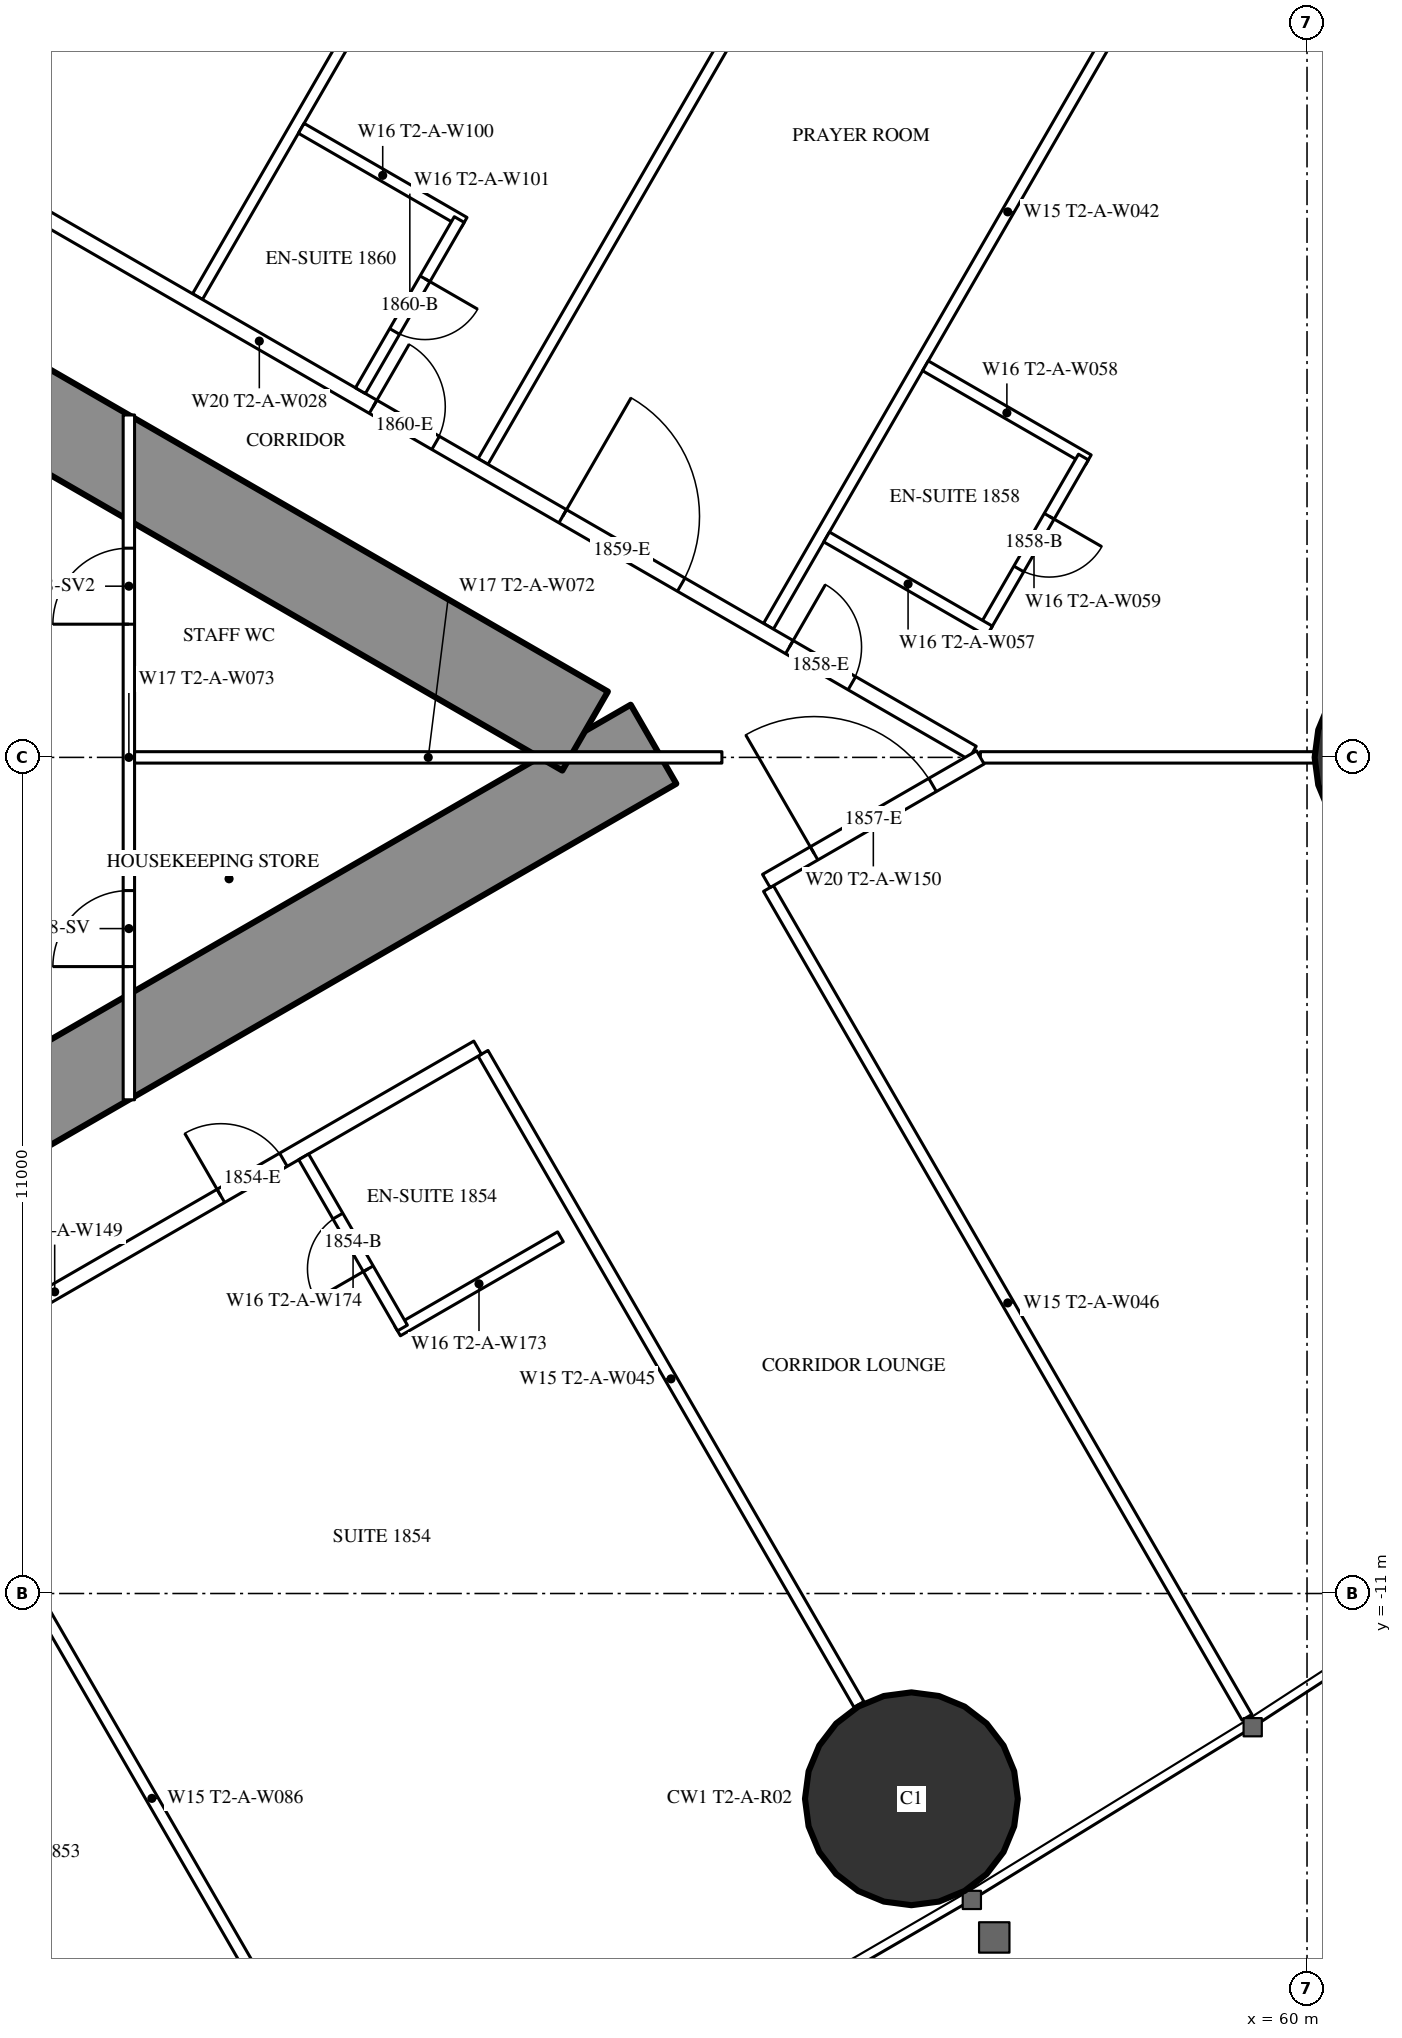
"""IFC4 building model, lengths in metres.
Left out: names, types, materials, properties, quantities, classifications, styles, units other than length and angle.
Written with IfcOpenShell. Run it as: python <this file> out.ifc"""

import sys

from ifc_helpers import new_model, si_unit, direction, frame, frame_2d, origin, origin_2d, place, context, subcontext, project, spatial, rectangle, hollow_circle, extrude, element, fill, save


model = new_model("IFC4")
c1 = context("Model", 3, precision=1e-05, world=origin(), true_north=direction((0.0, 1.0)))
c2 = subcontext(c1, "Body", "Model", "MODEL_VIEW")
j1 = project(units=[si_unit("LENGTHUNIT", "METRE"), si_unit("PLANEANGLEUNIT", "RADIAN")], contexts=[c1])
p1 = place(None, origin())
s1 = spatial("IfcSite", under=j1, at=p1, CompositionType="ELEMENT")
p2 = place(p1, origin())
s2 = spatial("IfcBuilding", under=s1, at=p2, CompositionType="ELEMENT")
p3 = place(p2, frame((0.0, 0.0, 70.5)))
s3 = spatial("IfcBuildingStorey", under=s2, at=p3, CompositionType="ELEMENT", Elevation=70.5)
p4 = place(p3, frame((54.795, -13.701, 0.0), z_axis=(0.0, 0.0, 1.0), x_axis=(1.0, 0.0, 0.0)))
e1 = element("IfcColumn", 1, at=p4, inside=s3, PredefinedType="COLUMN", context=c2, shape_type="SweptSolid", body=[
    extrude(hollow_circle(Radius=1.4, WallThickness=0.12, at=origin_2d()), origin(), (0.0, 0.0, 1.0), 3.5),
])
p5 = place(p3, frame((61.5, 0.0, 0.0), z_axis=(0.0, 0.0, 1.0), x_axis=(1.0, 0.0, 0.0)))
e2 = element("IfcColumn", 2, at=p5, inside=s3, PredefinedType="COLUMN", context=c2, shape_type="SweptSolid", body=[
    extrude(hollow_circle(Radius=1.4, WallThickness=0.1, at=origin_2d()), origin(), (0.0, 0.0, 1.0), 3.5),
])
p6 = place(p3, frame((27.2, -13.8, 0.0), z_axis=(0.0, 0.0, 1.0), x_axis=(0.866027159892, 0.499996958321, 0.0)))
e3 = element("IfcWall", 3, at=p6, inside=s3, PredefinedType="SHEAR", context=c2, shape_type="SweptSolid", body=[
    extrude(rectangle(XDim=27.947, YDim=1.2, at=frame_2d((13.973, 0.0))), origin(), (0.0, 0.0, 1.0), 3.5),
])
p7 = place(p6, frame((4.6, 0.0, 0.0)))
e4 = element("IfcOpeningElement", 4, at=p7, cuts=e3, PredefinedType="OPENING", context=c2, shape_type="SweptSolid", body=[
    extrude(rectangle(XDim=1.0, YDim=2.2, at=frame_2d((0.5, 1.1))), frame((0.0, 0.61, 0.0), z_axis=(0.0, -1.0, 0.0), x_axis=(1.0, 0.0, 0.0)), (0.0, 0.0, 1.0), 1.22),
])
p8 = place(p6, frame((13.395, 0.0, 0.0)))
e5 = element("IfcOpeningElement", 5, at=p8, cuts=e3, PredefinedType="OPENING", context=c2, shape_type="SweptSolid", body=[
    extrude(rectangle(XDim=1.8, YDim=2.2, at=frame_2d((0.9, 1.1))), frame((0.0, 0.61, 0.0), z_axis=(0.0, -1.0, 0.0), x_axis=(1.0, 0.0, 0.0)), (0.0, 0.0, 1.0), 1.22),
])
p9 = place(p3, frame((27.2, 13.8, 0.0), z_axis=(0.0, 0.0, 1.0), x_axis=(0.866024515034, -0.500001539357, 0.0)))
e6 = element("IfcWall", 6, at=p9, inside=s3, PredefinedType="SHEAR", context=c2, shape_type="SweptSolid", body=[
    extrude(rectangle(XDim=26.907, YDim=1.2, at=frame_2d((13.454, 0.0))), origin(), (0.0, 0.0, 1.0), 3.5),
])
p10 = place(p9, frame((4.6, 0.0, 0.0)))
e7 = element("IfcOpeningElement", 7, at=p10, cuts=e6, PredefinedType="OPENING", context=c2, shape_type="SweptSolid", body=[
    extrude(rectangle(XDim=1.0, YDim=2.2, at=frame_2d((0.5, 1.1))), frame((0.0, 0.61, 0.0), z_axis=(0.0, -1.0, 0.0), x_axis=(1.0, 0.0, 0.0)), (0.0, 0.0, 1.0), 1.22),
])
p11 = place(p9, frame((13.395, 0.0, 0.0)))
e8 = element("IfcOpeningElement", 8, at=p11, cuts=e6, PredefinedType="OPENING", context=c2, shape_type="SweptSolid", body=[
    extrude(rectangle(XDim=1.8, YDim=2.2, at=frame_2d((0.9, 1.1))), frame((0.0, 0.61, 0.0), z_axis=(0.0, -1.0, 0.0), x_axis=(1.0, 0.0, 0.0)), (0.0, 0.0, 1.0), 1.22),
])
p12 = place(p3, frame((41.647, -8.23, 0.0), z_axis=(0.0, 0.0, 1.0), x_axis=(0.49998590462, -0.866033541603, 0.0)))
e9 = element("IfcWall", 9, at=p12, inside=s3, PredefinedType="PARTITIONING", context=c2, shape_type="SweptSolid", body=[
    extrude(rectangle(XDim=12.621, YDim=0.15, at=frame_2d((6.311, 0.0))), origin(), (0.0, 0.0, 1.0), 3.25),
])
p13 = place(p3, frame((49.159, -3.893, 0.0), z_axis=(0.0, 0.0, 1.0), x_axis=(0.499998773722, -0.866026111775, 0.0)))
e10 = element("IfcWall", 10, at=p13, inside=s3, PredefinedType="PARTITIONING", context=c2, shape_type="SweptSolid", body=[
    extrude(rectangle(XDim=9.892, YDim=0.15, at=frame_2d((4.946, 0.0))), origin(), (0.0, 0.0, 1.0), 2.25),
])
p14 = place(p3, frame((52.915, -1.725, 0.0), z_axis=(0.0, 0.0, 1.0), x_axis=(0.499997163113, -0.866027041656, 0.0)))
e11 = element("IfcWall", 11, at=p14, inside=s3, PredefinedType="PARTITIONING", context=c2, shape_type="SweptSolid", body=[
    extrude(rectangle(XDim=12.591, YDim=0.15, at=frame_2d((6.295, 0.0))), origin(), (0.0, 0.0, 1.0), 3.25),
])
p15 = place(p3, frame((45.403, 6.062, 0.0), z_axis=(0.0, 0.0, 1.0), x_axis=(0.500013434677, 0.866017647131, 0.0)))
e12 = element("IfcWall", 12, at=p15, inside=s3, PredefinedType="PARTITIONING", context=c2, shape_type="SweptSolid", body=[
    extrude(rectangle(XDim=9.902, YDim=0.15, at=frame_2d((4.951, 0.0))), origin(), (0.0, 0.0, 1.0), 2.25),
])
p16 = place(p3, frame((49.159, 3.893, 0.0), z_axis=(0.0, 0.0, 1.0), x_axis=(0.499995664361, 0.866027906952, 0.0)))
e13 = element("IfcWall", 13, at=p16, inside=s3, PredefinedType="PARTITIONING", context=c2, shape_type="SweptSolid", body=[
    extrude(rectangle(XDim=12.711, YDim=0.15, at=frame_2d((6.356, 0.0))), origin(), (0.0, 0.0, 1.0), 3.25),
])
p17 = place(p3, frame((52.915, 1.725, 0.0), z_axis=(0.0, 0.0, 1.0), x_axis=(0.499997163113, 0.866027041656, 0.0)))
e14 = element("IfcWall", 14, at=p17, inside=s3, PredefinedType="PARTITIONING", context=c2, shape_type="SweptSolid", body=[
    extrude(rectangle(XDim=12.591, YDim=0.15, at=frame_2d((6.295, 0.0))), origin(), (0.0, 0.0, 1.0), 3.25),
])
p18 = place(p3, frame((55.702, 0.0, 0.0), z_axis=(0.0, 0.0, 1.0), x_axis=(1.0, 0.0, 0.0)))
e15 = element("IfcWall", 15, at=p18, inside=s3, PredefinedType="PARTITIONING", context=c2, shape_type="SweptSolid", body=[
    extrude(rectangle(XDim=16.117, YDim=0.15, at=frame_2d((8.059, 0.0))), origin(), (0.0, 0.0, 1.0), 2.25),
])
p19 = place(p3, frame((36.834, 10.894, 0.0), z_axis=(0.0, 0.0, 1.0), x_axis=(0.866028157229, -0.499995230863, 0.0)))
e16 = element("IfcWall", 16, at=p19, inside=s3, PredefinedType="PARTITIONING", context=c2, shape_type="SweptSolid", body=[
    extrude(rectangle(XDim=21.667, YDim=0.2, at=frame_2d((10.833, 0.0))), origin(), (0.0, 0.0, 1.0), 3.25),
])
p20 = place(p19, frame((18.885, 0.0, 0.0)))
e17 = element("IfcOpeningElement", 17, at=p20, cuts=e16, PredefinedType="OPENING", context=c2, shape_type="SweptSolid", body=[
    extrude(rectangle(XDim=0.95, YDim=2.2, at=frame_2d((0.475, 1.1))), frame((0.0, 0.11, 0.0), z_axis=(0.0, -1.0, 0.0), x_axis=(1.0, 0.0, 0.0)), (0.0, 0.0, 1.0), 0.22),
])
p21 = place(p19, frame((15.443, 0.0, 0.0)))
e18 = element("IfcOpeningElement", 18, at=p21, cuts=e16, PredefinedType="OPENING", context=c2, shape_type="SweptSolid", body=[
    extrude(rectangle(XDim=1.8, YDim=2.2, at=frame_2d((0.9, 1.1))), frame((0.0, 0.11, 0.0), z_axis=(0.0, -1.0, 0.0), x_axis=(1.0, 0.0, 0.0)), (0.0, 0.0, 1.0), 0.22),
])
p22 = place(p19, frame((12.562, 0.0, 0.0)))
e19 = element("IfcOpeningElement", 19, at=p22, cuts=e16, PredefinedType="OPENING", context=c2, shape_type="SweptSolid", body=[
    extrude(rectangle(XDim=0.95, YDim=2.2, at=frame_2d((0.475, 1.1))), frame((0.0, 0.11, 0.0), z_axis=(0.0, -1.0, 0.0), x_axis=(1.0, 0.0, 0.0)), (0.0, 0.0, 1.0), 0.22),
])
p23 = place(p19, frame((4.292, 0.0, 0.0)))
e20 = element("IfcOpeningElement", 20, at=p23, cuts=e16, PredefinedType="OPENING", context=c2, shape_type="SweptSolid", body=[
    extrude(rectangle(XDim=1.0, YDim=2.2, at=frame_2d((0.5, 1.1))), frame((0.0, 0.11, 0.0), z_axis=(0.0, -1.0, 0.0), x_axis=(1.0, 0.0, 0.0)), (0.0, 0.0, 1.0), 0.22),
])
p24 = place(p3, frame((37.96, -10.243, 0.0), z_axis=(0.0, 0.0, 1.0), x_axis=(0.866030548046, 0.499991089772, 0.0)))
e21 = element("IfcWall", 21, at=p24, inside=s3, PredefinedType="PARTITIONING", context=c2, shape_type="SweptSolid", body=[
    extrude(rectangle(XDim=12.849, YDim=0.2, at=frame_2d((6.425, 0.0))), origin(), (0.0, 0.0, 1.0), 3.25),
])
p25 = place(p24, frame((8.949, 0.0, 0.0)))
e22 = element("IfcOpeningElement", 22, at=p25, cuts=e21, PredefinedType="OPENING", context=c2, shape_type="SweptSolid", body=[
    extrude(rectangle(XDim=0.95, YDim=2.2, at=frame_2d((0.475, 1.1))), frame((0.0, 0.11, 0.0), z_axis=(0.0, -1.0, 0.0), x_axis=(1.0, 0.0, 0.0)), (0.0, 0.0, 1.0), 0.22),
])
p26 = place(p24, frame((0.6, 0.0, 0.0)))
e23 = element("IfcOpeningElement", 23, at=p26, cuts=e21, PredefinedType="OPENING", context=c2, shape_type="SweptSolid", body=[
    extrude(rectangle(XDim=0.95, YDim=2.2, at=frame_2d((0.475, 1.1))), frame((0.0, 0.11, 0.0), z_axis=(0.0, -1.0, 0.0), x_axis=(1.0, 0.0, 0.0)), (0.0, 0.0, 1.0), 0.22),
])
p27 = place(p3, frame((52.886, -1.626, 0.0), z_axis=(0.0, 0.0, 1.0), x_axis=(0.866030540913, 0.499991102127, 0.0)))
e24 = element("IfcWall", 24, at=p27, inside=s3, PredefinedType="PARTITIONING", context=c2, shape_type="SweptSolid", body=[
    extrude(rectangle(XDim=3.251, YDim=0.2, at=frame_2d((1.626, 0.0))), origin(), (0.0, 0.0, 1.0), 3.25),
])
p28 = place(p27, frame((0.726, 0.0, 0.0)))
e25 = element("IfcOpeningElement", 25, at=p28, cuts=e24, PredefinedType="OPENING", context=c2, shape_type="SweptSolid", body=[
    extrude(rectangle(XDim=1.8, YDim=2.2, at=frame_2d((0.9, 1.1))), frame((0.0, 0.11, 0.0), z_axis=(0.0, -1.0, 0.0), x_axis=(1.0, 0.0, 0.0)), (0.0, 0.0, 1.0), 0.22),
])
p29 = place(p3, frame((48.035, -7.545, 0.0), z_axis=(0.0, 0.0, 1.0), x_axis=(0.866006523861, 0.500032699561, 0.0)))
e26 = element("IfcWall", 26, at=p29, inside=s3, PredefinedType="PARTITIONING", context=c2, shape_type="SweptSolid", body=[
    extrude(rectangle(XDim=2.475, YDim=0.15, at=frame_2d((1.237, 0.0))), origin(), (0.0, 0.0, 1.0), 3.25),
])
p30 = place(p3, frame((46.8, -5.255, 0.0), z_axis=(0.0, 0.0, 1.0), x_axis=(0.500006934395, -0.866021400173, 0.0)))
e27 = element("IfcWall", 27, at=p30, inside=s3, PredefinedType="PARTITIONING", context=c2, shape_type="SweptSolid", body=[
    extrude(rectangle(XDim=2.6, YDim=0.15, at=frame_2d((1.3, 0.0))), origin(), (0.0, 0.0, 1.0), 3.25),
])
p31 = place(p30, frame((0.9, 0.0, 0.0)))
e28 = element("IfcOpeningElement", 28, at=p31, cuts=e27, PredefinedType="OPENING", context=c2, shape_type="SweptSolid", body=[
    extrude(rectangle(XDim=0.8, YDim=2.2, at=frame_2d((0.4, 1.1))), frame((0.0, 0.085, 0.0), z_axis=(0.0, -1.0, 0.0), x_axis=(1.0, 0.0, 0.0)), (0.0, 0.0, 1.0), 0.17),
])
p32 = place(p3, frame((54.98, 5.151, 0.0), z_axis=(0.0, 0.0, 1.0), x_axis=(0.86604923931, -0.499958713387, 0.0)))
e29 = element("IfcWall", 29, at=p32, inside=s3, PredefinedType="PARTITIONING", context=c2, shape_type="SweptSolid", body=[
    extrude(rectangle(XDim=2.475, YDim=0.15, at=frame_2d((1.237, 0.0))), origin(), (0.0, 0.0, 1.0), 3.25),
])
p33 = place(p3, frame((55.758, 1.7, 0.0), z_axis=(0.0, 0.0, 1.0), x_axis=(0.500006934395, 0.866021400173, 0.0)))
e30 = element("IfcWall", 30, at=p33, inside=s3, PredefinedType="PARTITIONING", context=c2, shape_type="SweptSolid", body=[
    extrude(rectangle(XDim=2.6, YDim=0.15, at=frame_2d((1.3, 0.0))), origin(), (0.0, 0.0, 1.0), 3.25),
])
p34 = place(p33, frame((0.9, 0.0, 0.0)))
e31 = element("IfcOpeningElement", 31, at=p34, cuts=e30, PredefinedType="OPENING", context=c2, shape_type="SweptSolid", body=[
    extrude(rectangle(XDim=0.8, YDim=2.2, at=frame_2d((0.4, 1.1))), frame((0.0, 0.085, 0.0), z_axis=(0.0, -1.0, 0.0), x_axis=(1.0, 0.0, 0.0)), (0.0, 0.0, 1.0), 0.17),
])
p35 = place(p3, frame((53.68, 2.9, 0.0), z_axis=(0.0, 0.0, 1.0), x_axis=(0.866006523861, -0.500032699561, 0.0)))
e32 = element("IfcWall", 32, at=p35, inside=s3, PredefinedType="PARTITIONING", context=c2, shape_type="SweptSolid", body=[
    extrude(rectangle(XDim=2.475, YDim=0.15, at=frame_2d((1.237, 0.0))), origin(), (0.0, 0.0, 1.0), 3.25),
])
p36 = place(p3, frame((46.768, 8.276, 0.0), z_axis=(0.0, 0.0, 1.0), x_axis=(0.866031185235, -0.4999899861, 0.0)))
e33 = element("IfcWall", 33, at=p36, inside=s3, PredefinedType="PARTITIONING", context=c2, shape_type="SweptSolid", body=[
    extrude(rectangle(XDim=2.475, YDim=0.15, at=frame_2d((1.238, 0.0))), origin(), (0.0, 0.0, 1.0), 3.25),
])
p37 = place(p3, frame((47.546, 4.824, 0.0), z_axis=(0.0, 0.0, 1.0), x_axis=(0.500006934395, 0.866021400173, 0.0)))
e34 = element("IfcWall", 34, at=p37, inside=s3, PredefinedType="PARTITIONING", context=c2, shape_type="SweptSolid", body=[
    extrude(rectangle(XDim=2.6, YDim=0.15, at=frame_2d((1.3, 0.0))), origin(), (0.0, 0.0, 1.0), 3.25),
])
p38 = place(p37, frame((0.9, 0.0, 0.0)))
e35 = element("IfcOpeningElement", 35, at=p38, cuts=e34, PredefinedType="OPENING", context=c2, shape_type="SweptSolid", body=[
    extrude(rectangle(XDim=0.8, YDim=2.2, at=frame_2d((0.4, 1.1))), frame((0.0, 0.085, 0.0), z_axis=(0.0, -1.0, 0.0), x_axis=(1.0, 0.0, 0.0)), (0.0, 0.0, 1.0), 0.17),
])
p39 = place(p3, frame((44.5, -4.505, 0.0), z_axis=(0.0, 0.0, 1.0), x_axis=(0.0, 1.0, 0.0)))
e36 = element("IfcWall", 36, at=p39, inside=s3, PredefinedType="PARTITIONING", context=c2, shape_type="SweptSolid", body=[
    extrude(rectangle(XDim=9.009, YDim=0.15, at=frame_2d((4.505, 0.0))), origin(), (0.0, 0.0, 1.0), 2.45),
])
p40 = place(p39, frame((1.752, 0.0, 0.0)))
e37 = element("IfcOpeningElement", 37, at=p40, cuts=e36, PredefinedType="OPENING", context=c2, shape_type="SweptSolid", body=[
    extrude(rectangle(XDim=1.0, YDim=2.2, at=frame_2d((0.5, 1.1))), frame((0.0, 0.085, 0.0), z_axis=(0.0, -1.0, 0.0), x_axis=(1.0, 0.0, 0.0)), (0.0, 0.0, 1.0), 0.17),
])
p41 = place(p39, frame((6.257, 0.0, 0.0)))
e38 = element("IfcOpeningElement", 38, at=p41, cuts=e36, PredefinedType="OPENING", context=c2, shape_type="SweptSolid", body=[
    extrude(rectangle(XDim=1.0, YDim=2.2, at=frame_2d((0.5, 1.1))), frame((0.0, 0.085, 0.0), z_axis=(0.0, -1.0, 0.0), x_axis=(1.0, 0.0, 0.0)), (0.0, 0.0, 1.0), 0.17),
])
p42 = place(p3, frame((44.575, 0.0, 0.0), z_axis=(0.0, 0.0, 1.0), x_axis=(1.0, 0.0, 0.0)))
e39 = element("IfcWall", 39, at=p42, inside=s3, PredefinedType="PARTITIONING", context=c2, shape_type="SweptSolid", body=[
    extrude(rectangle(XDim=7.727, YDim=0.15, at=frame_2d((3.864, 0.0))), origin(), (0.0, 0.0, 1.0), 2.25),
])
p43 = place(p31, origin())
e40 = element("IfcDoor", 40, at=p43, inside=s3, OperationType="SINGLE_SWING_RIGHT", PredefinedType="DOOR", context=c2, shape_type="SweptSolid", body=[
    extrude(rectangle(XDim=0.8, YDim=2.2, at=frame_2d((0.4, 1.1))), frame((0.0, 0.025, 0.0), z_axis=(0.0, -1.0, 0.0), x_axis=(1.0, 0.0, 0.0)), (0.0, 0.0, 1.0), 0.05),
])
fill(e28, e40)
p44 = place(p25, origin())
e41 = element("IfcDoor", 41, at=p44, inside=s3, OperationType="SINGLE_SWING_LEFT", PredefinedType="DOOR", context=c2, shape_type="SweptSolid", body=[
    extrude(rectangle(XDim=0.95, YDim=2.2, at=frame_2d((0.475, 1.1))), frame((0.0, 0.025, 0.0), z_axis=(0.0, -1.0, 0.0), x_axis=(1.0, 0.0, 0.0)), (0.0, 0.0, 1.0), 0.05),
])
fill(e22, e41)
p45 = place(p28, origin())
e42 = element("IfcDoor", 42, at=p45, inside=s3, OperationType="DOUBLE_DOOR_SINGLE_SWING", PredefinedType="DOOR", context=c2, shape_type="SweptSolid", body=[
    extrude(rectangle(XDim=1.8, YDim=2.2, at=frame_2d((0.9, 1.1))), frame((0.0, 0.025, 0.0), z_axis=(0.0, -1.0, 0.0), x_axis=(1.0, 0.0, 0.0)), (0.0, 0.0, 1.0), 0.05),
])
fill(e25, e42)
p46 = place(p34, origin())
e43 = element("IfcDoor", 43, at=p46, inside=s3, OperationType="SINGLE_SWING_RIGHT", PredefinedType="DOOR", context=c2, shape_type="SweptSolid", body=[
    extrude(rectangle(XDim=0.8, YDim=2.2, at=frame_2d((0.4, 1.1))), frame((0.0, 0.025, 0.0), z_axis=(0.0, -1.0, 0.0), x_axis=(1.0, 0.0, 0.0)), (0.0, 0.0, 1.0), 0.05),
])
fill(e31, e43)
p47 = place(p20, origin())
e44 = element("IfcDoor", 44, at=p47, inside=s3, OperationType="SINGLE_SWING_LEFT", PredefinedType="DOOR", context=c2, shape_type="SweptSolid", body=[
    extrude(rectangle(XDim=0.95, YDim=2.2, at=frame_2d((0.475, 1.1))), frame((0.0, 0.025, 0.0), z_axis=(0.0, -1.0, 0.0), x_axis=(1.0, 0.0, 0.0)), (0.0, 0.0, 1.0), 0.05),
])
fill(e17, e44)
p48 = place(p21, origin())
e45 = element("IfcDoor", 45, at=p48, inside=s3, OperationType="DOUBLE_DOOR_SINGLE_SWING", PredefinedType="DOOR", context=c2, shape_type="SweptSolid", body=[
    extrude(rectangle(XDim=1.8, YDim=2.2, at=frame_2d((0.9, 1.1))), frame((0.0, 0.025, 0.0), z_axis=(0.0, -1.0, 0.0), x_axis=(1.0, 0.0, 0.0)), (0.0, 0.0, 1.0), 0.05),
])
fill(e18, e45)
p49 = place(p38, origin())
e46 = element("IfcDoor", 46, at=p49, inside=s3, OperationType="SINGLE_SWING_RIGHT", PredefinedType="DOOR", context=c2, shape_type="SweptSolid", body=[
    extrude(rectangle(XDim=0.8, YDim=2.2, at=frame_2d((0.4, 1.1))), frame((0.0, 0.025, 0.0), z_axis=(0.0, -1.0, 0.0), x_axis=(1.0, 0.0, 0.0)), (0.0, 0.0, 1.0), 0.05),
])
fill(e35, e46)
p50 = place(p22, origin())
e47 = element("IfcDoor", 47, at=p50, inside=s3, OperationType="SINGLE_SWING_LEFT", PredefinedType="DOOR", context=c2, shape_type="SweptSolid", body=[
    extrude(rectangle(XDim=0.95, YDim=2.2, at=frame_2d((0.475, 1.1))), frame((0.0, 0.025, 0.0), z_axis=(0.0, -1.0, 0.0), x_axis=(1.0, 0.0, 0.0)), (0.0, 0.0, 1.0), 0.05),
])
fill(e19, e47)
p51 = place(p40, origin())
e48 = element("IfcDoor", 48, at=p51, inside=s3, OperationType="SINGLE_SWING_LEFT", PredefinedType="DOOR", context=c2, shape_type="SweptSolid", body=[
    extrude(rectangle(XDim=1.0, YDim=2.2, at=frame_2d((0.5, 1.1))), frame((0.0, 0.025, 0.0), z_axis=(0.0, -1.0, 0.0), x_axis=(1.0, 0.0, 0.0)), (0.0, 0.0, 1.0), 0.05),
])
fill(e37, e48)
p52 = place(p41, origin())
e49 = element("IfcDoor", 49, at=p52, inside=s3, OperationType="SINGLE_SWING_LEFT", PredefinedType="DOOR", context=c2, shape_type="SweptSolid", body=[
    extrude(rectangle(XDim=1.0, YDim=2.2, at=frame_2d((0.5, 1.1))), frame((0.0, 0.025, 0.0), z_axis=(0.0, -1.0, 0.0), x_axis=(1.0, 0.0, 0.0)), (0.0, 0.0, 1.0), 0.05),
])
fill(e38, e49)
save(model, sys.argv[1])
